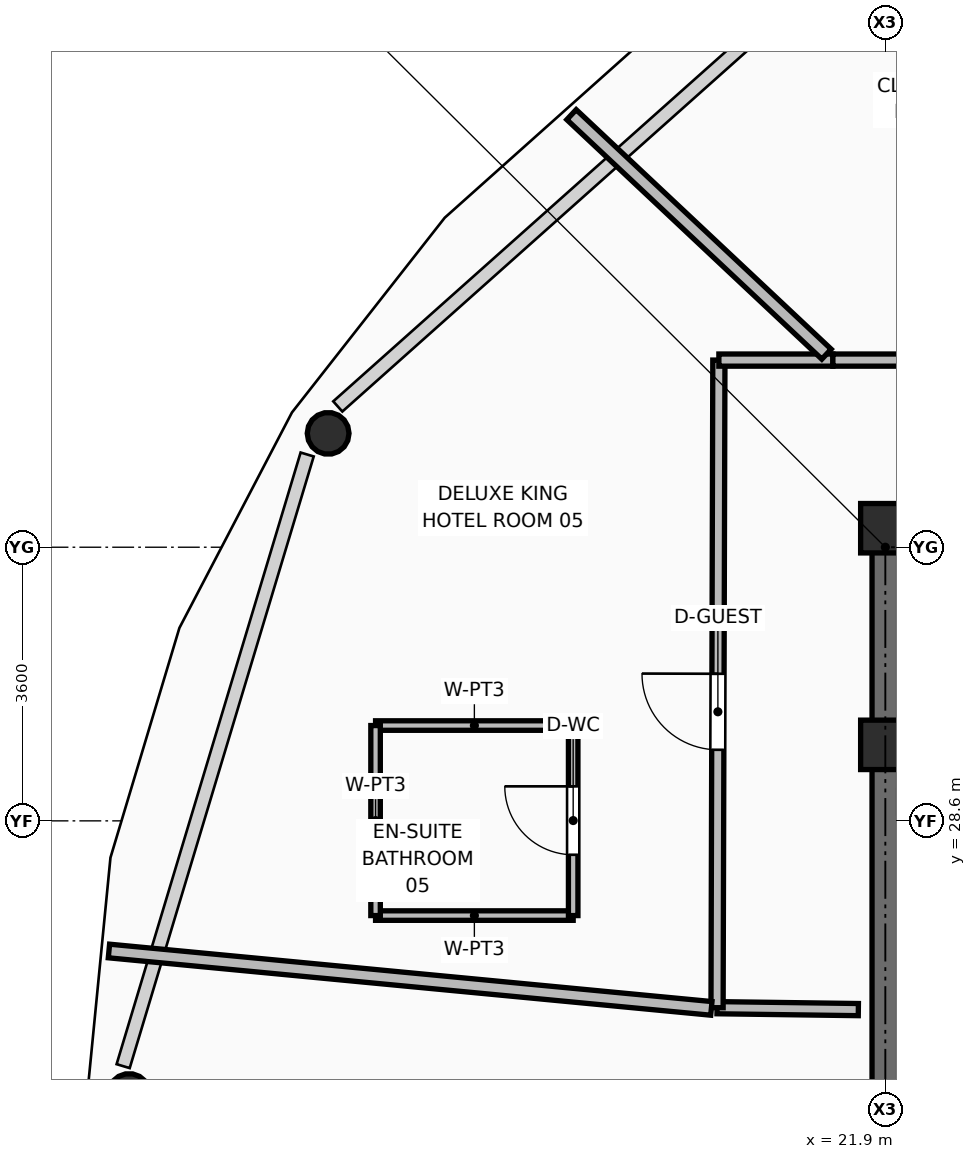
"""IFC4 building model, lengths in metres.
Left out: names, types, materials, properties, quantities, classifications, styles, units other than length and angle.
Written with IfcOpenShell. Run it as: python <this file> out.ifc"""

import sys

from ifc_helpers import new_model, si_unit, direction, frame, frame_2d, origin, origin_2d, place, context, subcontext, project, spatial, rectangle, hollow_circle, extrude, element, fill, save


model = new_model("IFC4")
c1 = context("Model", 3, precision=1e-05, world=origin(), true_north=direction((0.0, 1.0)))
c2 = subcontext(c1, "Body", "Model", "MODEL_VIEW")
j1 = project(units=[si_unit("LENGTHUNIT", "METRE"), si_unit("PLANEANGLEUNIT", "RADIAN")], contexts=[c1])
p1 = place(None, origin())
s1 = spatial("IfcSite", under=j1, at=p1, CompositionType="ELEMENT")
p2 = place(p1, origin())
s2 = spatial("IfcBuilding", under=s1, at=p2, CompositionType="ELEMENT")
p3 = place(p2, frame((0.0, 0.0, 278.85)))
s3 = spatial("IfcBuildingStorey", under=s2, at=p3, CompositionType="ELEMENT", Elevation=278.85)
for number, where, z_axis, x_axis in (
    (1, (21.9, 29.6, 0.0), (0.0, 0.0, 1.0), (1.0, 0.0, 0.0)),
    (2, (21.9, 32.45, 0.0), (0.0, 0.0, 1.0), (1.0, 0.0, 0.0)),
):
    element("IfcColumn", number, at=place(p3, frame(where, z_axis=z_axis, x_axis=x_axis)), inside=s3, PredefinedType="COLUMN", context=c2, shape_type="SweptSolid", body=[
        extrude(rectangle(XDim=0.65, YDim=0.65, at=origin_2d()), origin(), (0.0, 0.0, 1.0), 3.75),
    ])
p4 = place(p3, frame((14.569, 33.698, 0.0), z_axis=(0.185218066702, -0.09531807333, 0.978063767177), x_axis=(0.457587432232, 0.889164631474, 0.0)))
e3 = element("IfcColumn", 3, at=p4, inside=s3, PredefinedType="COLUMN", context=c2, shape_type="SweptSolid", body=[
    extrude(hollow_circle(Radius=0.275, WallThickness=0.025, at=origin_2d()), origin(), (0.0, 0.0, 1.0), 3.65),
])
p5 = place(p3, frame((11.95, 25.0, 0.0), z_axis=(0.213469718958, 0.0, 0.97694968094), x_axis=(0.0, 1.0, 0.0)))
e4 = element("IfcColumn", 4, at=p5, inside=s3, PredefinedType="COLUMN", context=c2, shape_type="SweptSolid", body=[
    extrude(hollow_circle(Radius=0.275, WallThickness=0.025, at=origin_2d()), origin(), (0.0, 0.0, 1.0), 3.654),
])
p6 = place(p3, frame((21.725, 32.45, 0.0), z_axis=(0.0, 0.0, 1.0), x_axis=(1.0, 0.0, 0.0)))
e5 = element("IfcWall", 5, at=p6, inside=s3, PredefinedType="SHEAR", context=c2, shape_type="SweptSolid", body=[
    extrude(rectangle(XDim=19.55, YDim=0.35, at=frame_2d((9.775, 0.0))), origin(), (0.0, 0.0, 1.0), 3.57),
])
p7 = place(p6, frame((2.025, 0.0, 0.0)))
e6 = element("IfcOpeningElement", 6, at=p7, cuts=e5, PredefinedType="OPENING", context=c2, shape_type="SweptSolid", body=[
    extrude(rectangle(XDim=1.1, YDim=2.1, at=frame_2d((0.55, 1.05))), frame((0.0, 0.185, 0.0), z_axis=(0.0, -1.0, 0.0), x_axis=(1.0, 0.0, 0.0)), (0.0, 0.0, 1.0), 0.37),
])
p8 = place(p6, frame((15.415, 0.0, 0.0)))
e7 = element("IfcOpeningElement", 7, at=p8, cuts=e5, PredefinedType="OPENING", context=c2, shape_type="SweptSolid", body=[
    extrude(rectangle(XDim=1.0, YDim=2.1, at=frame_2d((0.5, 1.05))), frame((0.0, 0.185, 0.0), z_axis=(0.0, -1.0, 0.0), x_axis=(1.0, 0.0, 0.0)), (0.0, 0.0, 1.0), 0.37),
])
p9 = place(p6, frame((17.425, 0.0, 0.0)))
e8 = element("IfcOpeningElement", 8, at=p9, cuts=e5, PredefinedType="OPENING", context=c2, shape_type="SweptSolid", body=[
    extrude(rectangle(XDim=0.9, YDim=2.1, at=frame_2d((0.45, 1.05))), frame((0.0, 0.185, 0.0), z_axis=(0.0, -1.0, 0.0), x_axis=(1.0, 0.0, 0.0)), (0.0, 0.0, 1.0), 0.37),
])
p10 = place(p3, frame((21.9, 17.975, 0.0), z_axis=(0.0, 0.0, 1.0), x_axis=(0.0, 1.0, 0.0)))
e9 = element("IfcWall", 9, at=p10, inside=s3, PredefinedType="SHEAR", context=c2, shape_type="SweptSolid", body=[
    extrude(rectangle(XDim=14.3, YDim=0.35, at=frame_2d((7.15, 0.0))), origin(), (0.0, 0.0, 1.0), 3.57),
])
p11 = place(p3, frame((21.545, 26.117, 0.0), z_axis=(0.0, 0.0, 1.0), x_axis=(-0.999908513059, 0.0135264745, 0.0)))
e10 = element("IfcWall", 10, at=p11, inside=s3, PredefinedType="PARTITIONING", context=c2, shape_type="SweptSolid", body=[
    extrude(rectangle(XDim=1.859, YDim=0.16, at=frame_2d((0.93, 0.0))), origin(), (0.0, 0.0, 1.0), 2.595),
])
p12 = place(p3, frame((19.686, 26.142, 0.0), z_axis=(0.0, 0.0, 1.0), x_axis=(0.002808172778, 0.999996057075, 0.0)))
e11 = element("IfcWall", 11, at=p12, inside=s3, PredefinedType="PARTITIONING", context=c2, shape_type="SweptSolid", body=[
    extrude(rectangle(XDim=8.52, YDim=0.16, at=frame_2d((4.26, 0.0))), origin(), (0.0, 0.0, 1.0), 3.132),
])
p13 = place(p12, frame((3.393, 0.0, 0.0)))
e12 = element("IfcOpeningElement", 12, at=p13, cuts=e11, PredefinedType="OPENING", context=c2, shape_type="SweptSolid", body=[
    extrude(rectangle(XDim=1.0, YDim=2.1, at=frame_2d((0.5, 1.05))), frame((0.0, 0.09, 0.0), z_axis=(0.0, -1.0, 0.0), x_axis=(1.0, 0.0, 0.0)), (0.0, 0.0, 1.0), 0.18),
])
p14 = place(p3, frame((19.71, 34.662, 0.0), z_axis=(0.0, 0.0, 1.0), x_axis=(1.0, 0.0, 0.0)))
e13 = element("IfcWall", 13, at=p14, inside=s3, PredefinedType="PARTITIONING", context=c2, shape_type="SweptSolid", body=[
    extrude(rectangle(XDim=1.5, YDim=0.16, at=frame_2d((0.75, 0.0))), origin(), (0.0, 0.0, 1.0), 3.55),
])
p15 = place(p3, frame((21.21, 34.662, 0.0), z_axis=(0.0, 0.0, 1.0), x_axis=(0.999999979201, -0.000203956757, 0.0)))
e14 = element("IfcWall", 14, at=p15, inside=s3, PredefinedType="PARTITIONING", context=c2, shape_type="SweptSolid", body=[
    extrude(rectangle(XDim=5.985, YDim=0.16, at=frame_2d((2.993, 0.0))), origin(), (0.0, 0.0, 1.0), 3.132),
])
p16 = place(p15, frame((2.347, 0.0, 0.0)))
e15 = element("IfcOpeningElement", 15, at=p16, cuts=e14, PredefinedType="OPENING", context=c2, shape_type="SweptSolid", body=[
    extrude(rectangle(XDim=1.0, YDim=2.1, at=frame_2d((0.5, 1.05))), frame((0.0, 0.09, 0.0), z_axis=(0.0, -1.0, 0.0), x_axis=(1.0, 0.0, 0.0)), (0.0, 0.0, 1.0), 0.18),
])
p17 = place(p3, frame((21.126, 34.74, 0.0), z_axis=(0.0, 0.0, 1.0), x_axis=(-0.728905018714, 0.684614836016, 0.0)))
e16 = element("IfcWall", 16, at=p17, inside=s3, PredefinedType="PARTITIONING", context=c2, shape_type="SweptSolid", body=[
    extrude(rectangle(XDim=4.603, YDim=0.18, at=frame_2d((2.301, 0.0))), origin(), (0.0, 0.0, 1.0), 3.003),
])
p18 = place(p3, frame((19.611, 26.133, 0.0), z_axis=(0.0, 0.0, 1.0), x_axis=(-0.995495196961, 0.094811986724, 0.0)))
e17 = element("IfcWall", 17, at=p18, inside=s3, PredefinedType="PARTITIONING", context=c2, shape_type="SweptSolid", body=[
    extrude(rectangle(XDim=7.962, YDim=0.18, at=frame_2d((3.981, 0.0))), origin(), (0.0, 0.0, 1.0), 3.003),
])
for number, where, z_axis, x_axis in (
    (18, (15.193, 27.354, 0.0), (0.0, 0.0, 1.0), (1.0, 0.0, 0.0)),
    (19, (15.193, 29.854, 0.0), (0.0, 0.0, 1.0), (1.0, 0.0, 0.0)),
):
    element("IfcWall", number, at=place(p3, frame(where, z_axis=z_axis, x_axis=x_axis)), inside=s3, PredefinedType="PARTITIONING", context=c2, shape_type="SweptSolid", body=[
        extrude(rectangle(XDim=2.6, YDim=0.125, at=frame_2d((1.3, 0.0))), origin(), (0.0, 0.0, 1.0), 3.55),
    ])
p19 = place(p3, frame((15.193, 27.354, 0.0), z_axis=(0.0, 0.0, 1.0), x_axis=(0.0, 1.0, 0.0)))
e20 = element("IfcWall", 20, at=p19, inside=s3, PredefinedType="PARTITIONING", context=c2, shape_type="SweptSolid", body=[
    extrude(rectangle(XDim=2.5, YDim=0.125, at=frame_2d((1.25, 0.0))), origin(), (0.0, 0.0, 1.0), 3.55),
])
p20 = place(p3, frame((17.793, 27.354, 0.0), z_axis=(0.0, 0.0, 1.0), x_axis=(0.0, 1.0, 0.0)))
e21 = element("IfcWall", 21, at=p20, inside=s3, PredefinedType="PARTITIONING", context=c2, shape_type="SweptSolid", body=[
    extrude(rectangle(XDim=2.5, YDim=0.125, at=frame_2d((1.25, 0.0))), origin(), (0.0, 0.0, 1.0), 3.55),
])
p21 = place(p20, frame((0.8, 0.0, 0.0)))
e22 = element("IfcOpeningElement", 22, at=p21, cuts=e21, PredefinedType="OPENING", context=c2, shape_type="SweptSolid", body=[
    extrude(rectangle(XDim=0.9, YDim=2.1, at=frame_2d((0.45, 1.05))), frame((0.0, 0.073, 0.0), z_axis=(0.0, -1.0, 0.0), x_axis=(1.0, 0.0, 0.0)), (0.0, 0.0, 1.0), 0.145),
])
p22 = place(p21, origin())
e23 = element("IfcDoor", 23, at=p22, inside=s3, OperationType="SINGLE_SWING_RIGHT", PredefinedType="DOOR", context=c2, shape_type="SweptSolid", body=[
    extrude(rectangle(XDim=0.9, YDim=2.1, at=frame_2d((0.45, 1.05))), frame((0.0, 0.025, 0.0), z_axis=(0.0, -1.0, 0.0), x_axis=(1.0, 0.0, 0.0)), (0.0, 0.0, 1.0), 0.05),
])
fill(e22, e23)
p23 = place(p13, origin())
e24 = element("IfcDoor", 24, at=p23, inside=s3, OperationType="SINGLE_SWING_RIGHT", PredefinedType="DOOR", context=c2, shape_type="SweptSolid", body=[
    extrude(rectangle(XDim=1.0, YDim=2.1, at=frame_2d((0.5, 1.05))), frame((0.0, 0.025, 0.0), z_axis=(0.0, -1.0, 0.0), x_axis=(1.0, 0.0, 0.0)), (0.0, 0.0, 1.0), 0.05),
])
fill(e12, e24)
save(model, sys.argv[1])
